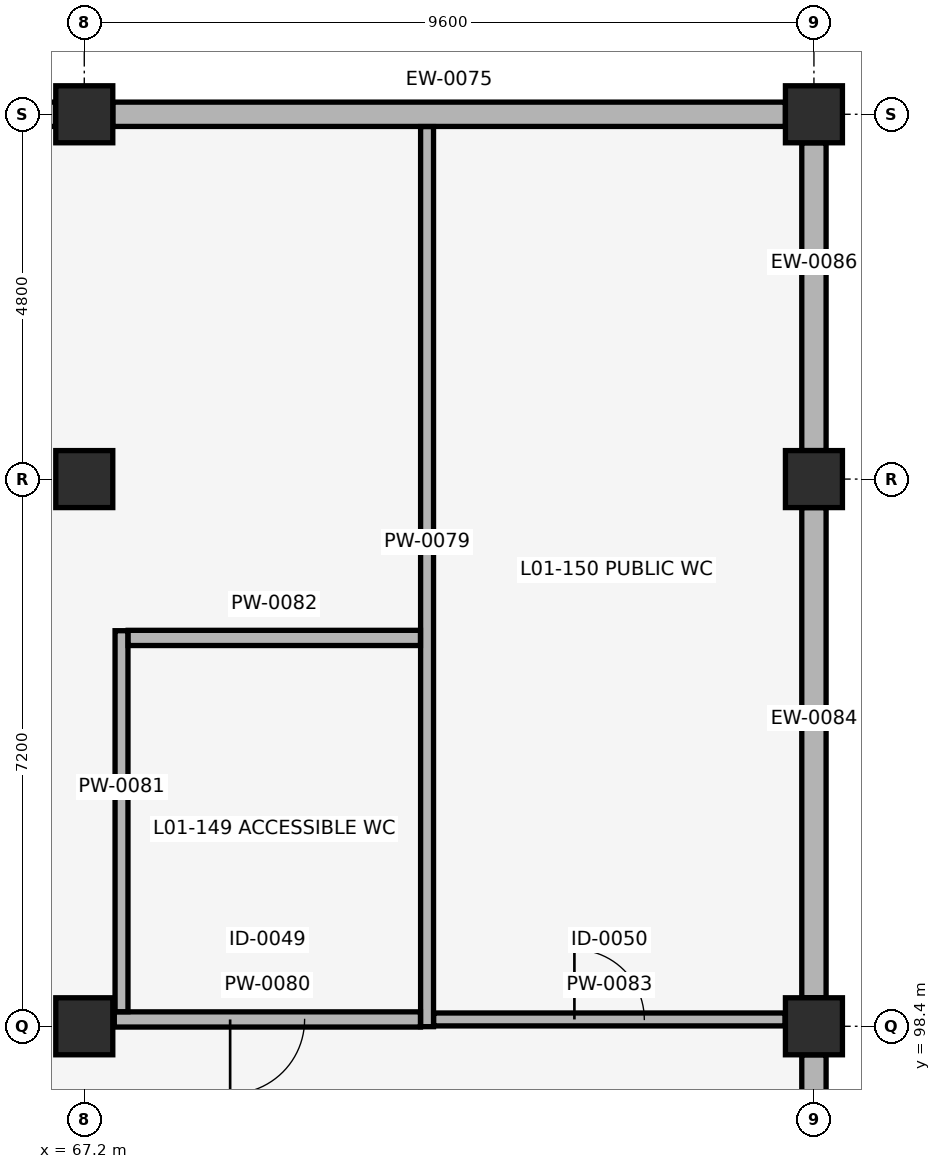
"""IFC4 building model, lengths in metres.
Left out: names, types, materials, properties, quantities, classifications, styles, units other than length and angle.
Written with IfcOpenShell. Run it as: python <this file> out.ifc"""

import sys

from ifc_helpers import new_model, si_unit, direction, frame, frame_2d, origin, origin_2d, place, context, subcontext, project, spatial, rectangle, extrude, element, fill, save


model = new_model("IFC4")
c1 = context("Model", 3, precision=1e-05, world=origin(), true_north=direction((0.0, 1.0)))
c2 = subcontext(c1, "Body", "Model", "MODEL_VIEW")
j1 = project(units=[si_unit("LENGTHUNIT", "METRE"), si_unit("PLANEANGLEUNIT", "RADIAN")], contexts=[c1])
p1 = place(None, origin())
s1 = spatial("IfcSite", under=j1, at=p1, CompositionType="ELEMENT")
p2 = place(p1, origin())
s2 = spatial("IfcBuilding", under=s1, at=p2, CompositionType="ELEMENT")
p3 = place(p2, frame((0.0, 0.0, 4.42)))
s3 = spatial("IfcBuildingStorey", under=s2, at=p3, CompositionType="ELEMENT", Elevation=4.42)
for number, where, z_axis, x_axis in (
    (1, (67.2, 98.4, 0.0), (0.0, 0.0, 1.0), (1.0, 0.0, 0.0)),
    (2, (67.2, 105.6, 0.0), (0.0, 0.0, 1.0), (1.0, 0.0, 0.0)),
    (3, (67.2, 110.4, 0.0), (0.0, 0.0, 1.0), (1.0, 0.0, 0.0)),
    (4, (76.8, 98.4, 0.0), (0.0, 0.0, 1.0), (1.0, 0.0, 0.0)),
    (5, (76.8, 105.6, 0.0), (0.0, 0.0, 1.0), (1.0, 0.0, 0.0)),
    (6, (76.8, 110.4, 0.0), (0.0, 0.0, 1.0), (1.0, 0.0, 0.0)),
):
    element("IfcColumn", number, at=place(p3, frame(where, z_axis=z_axis, x_axis=x_axis)), inside=s3, PredefinedType="COLUMN", context=c2, shape_type="SweptSolid", body=[
        extrude(rectangle(XDim=0.75, YDim=0.75, at=origin_2d()), origin(), (0.0, 0.0, 1.0), 4.08),
    ])
p4 = place(p3, frame((66.825, 110.4, 0.0), z_axis=(0.0, 0.0, 1.0), x_axis=(-1.0, 0.0, 0.0)))
e7 = element("IfcWall", 7, at=p4, inside=s3, PredefinedType="SOLIDWALL", context=c2, shape_type="SweptSolid", body=[
    extrude(rectangle(XDim=8.85, YDim=0.32, at=frame_2d((4.425, 0.0))), origin(), (0.0, 0.0, 1.0), 3.05),
])
p5 = place(p3, frame((76.425, 110.4, 0.0), z_axis=(0.0, 0.0, 1.0), x_axis=(-1.0, 0.0, 0.0)))
e8 = element("IfcWall", 8, at=p5, inside=s3, PredefinedType="SOLIDWALL", context=c2, shape_type="SweptSolid", body=[
    extrude(rectangle(XDim=8.85, YDim=0.32, at=frame_2d((4.425, 0.0))), origin(), (0.0, 0.0, 1.0), 3.05),
])
p6 = place(p3, frame((76.8, 91.575, 0.0), z_axis=(0.0, 0.0, 1.0), x_axis=(0.0, 1.0, 0.0)))
e9 = element("IfcWall", 9, at=p6, inside=s3, PredefinedType="SOLIDWALL", context=c2, shape_type="SweptSolid", body=[
    extrude(rectangle(XDim=6.45, YDim=0.32, at=frame_2d((3.225, 0.0))), origin(), (0.0, 0.0, 1.0), 3.05),
])
p7 = place(p3, frame((76.8, 98.775, 0.0), z_axis=(0.0, 0.0, 1.0), x_axis=(0.0, 1.0, 0.0)))
e10 = element("IfcWall", 10, at=p7, inside=s3, PredefinedType="SOLIDWALL", context=c2, shape_type="SweptSolid", body=[
    extrude(rectangle(XDim=6.45, YDim=0.32, at=frame_2d((3.225, 0.0))), origin(), (0.0, 0.0, 1.0), 3.05),
])
p8 = place(p3, frame((76.8, 105.975, 0.0), z_axis=(0.0, 0.0, 1.0), x_axis=(0.0, 1.0, 0.0)))
e11 = element("IfcWall", 11, at=p8, inside=s3, PredefinedType="SOLIDWALL", context=c2, shape_type="SweptSolid", body=[
    extrude(rectangle(XDim=4.05, YDim=0.32, at=frame_2d((2.025, 0.0))), origin(), (0.0, 0.0, 1.0), 3.05),
])
p9 = place(p3, frame((71.71, 98.395, 0.0), z_axis=(0.0, 0.0, 1.0), x_axis=(0.0, 1.0, 0.0)))
e12 = element("IfcWall", 12, at=p9, inside=s3, PredefinedType="PLUMBINGWALL", context=c2, shape_type="SweptSolid", body=[
    extrude(rectangle(XDim=11.843, YDim=0.17, at=frame_2d((5.921, 0.0))), origin(), (0.0, 0.0, 1.0), 3.05),
])
p10 = place(p3, frame((67.595, 98.49, 0.0), z_axis=(0.0, 0.0, 1.0), x_axis=(1.0, 0.0, 0.0)))
e13 = element("IfcWall", 13, at=p10, inside=s3, PredefinedType="PLUMBINGWALL", context=c2, shape_type="SweptSolid", body=[
    extrude(rectangle(XDim=4.028, YDim=0.2, at=frame_2d((2.014, 0.0))), origin(), (0.0, 0.0, 1.0), 3.12),
])
p11 = place(p10, frame((1.524, 0.0, 0.0)))
e14 = element("IfcOpeningElement", 14, at=p11, cuts=e13, PredefinedType="OPENING", context=c2, shape_type="SweptSolid", body=[
    extrude(rectangle(XDim=0.98, YDim=2.08, at=frame_2d((0.49, 1.04))), frame((0.0, 0.11, 0.0), z_axis=(0.0, -1.0, 0.0), x_axis=(1.0, 0.0, 0.0)), (0.0, 0.0, 1.0), 0.22),
])
p12 = place(p3, frame((67.69, 98.592, 0.0), z_axis=(0.0, 0.0, 1.0), x_axis=(0.0, 1.0, 0.0)))
e15 = element("IfcWall", 15, at=p12, inside=s3, PredefinedType="PLUMBINGWALL", context=c2, shape_type="SweptSolid", body=[
    extrude(rectangle(XDim=5.013, YDim=0.17, at=frame_2d((2.506, 0.0))), origin(), (0.0, 0.0, 1.0), 3.12),
])
p13 = place(p3, frame((67.777, 103.51, 0.0), z_axis=(0.0, 0.0, 1.0), x_axis=(1.0, 0.0, 0.0)))
e16 = element("IfcWall", 16, at=p13, inside=s3, PredefinedType="PLUMBINGWALL", context=c2, shape_type="SweptSolid", body=[
    extrude(rectangle(XDim=3.846, YDim=0.2, at=frame_2d((1.923, 0.0))), origin(), (0.0, 0.0, 1.0), 3.12),
])
p14 = place(p3, frame((71.797, 98.49, 0.0), z_axis=(0.0, 0.0, 1.0), x_axis=(1.0, 0.0, 0.0)))
e17 = element("IfcWall", 17, at=p14, inside=s3, PredefinedType="PLUMBINGWALL", context=c2, shape_type="SweptSolid", body=[
    extrude(rectangle(XDim=4.623, YDim=0.17, at=frame_2d((2.312, 0.0))), origin(), (0.0, 0.0, 1.0), 3.12),
])
p15 = place(p14, frame((1.852, 0.0, 0.0)))
e18 = element("IfcOpeningElement", 18, at=p15, cuts=e17, PredefinedType="OPENING", context=c2, shape_type="SweptSolid", body=[
    extrude(rectangle(XDim=0.92, YDim=2.08, at=frame_2d((0.46, 1.04))), frame((0.0, 0.095, 0.0), z_axis=(0.0, -1.0, 0.0), x_axis=(1.0, 0.0, 0.0)), (0.0, 0.0, 1.0), 0.19),
])
p16 = place(p11, origin())
e19 = element("IfcDoor", 19, at=p16, inside=s3, OperationType="SINGLE_SWING_RIGHT", PredefinedType="DOOR", context=c2, shape_type="SweptSolid", body=[
    extrude(rectangle(XDim=0.98, YDim=2.08, at=frame_2d((0.49, 1.04))), frame((0.0, 0.025, 0.0), z_axis=(0.0, -1.0, 0.0), x_axis=(1.0, 0.0, 0.0)), (0.0, 0.0, 1.0), 0.05),
])
fill(e14, e19)
p17 = place(p15, origin())
e20 = element("IfcDoor", 20, at=p17, inside=s3, OperationType="SINGLE_SWING_LEFT", PredefinedType="DOOR", context=c2, shape_type="SweptSolid", body=[
    extrude(rectangle(XDim=0.92, YDim=2.08, at=frame_2d((0.46, 1.04))), frame((0.0, 0.025, 0.0), z_axis=(0.0, -1.0, 0.0), x_axis=(1.0, 0.0, 0.0)), (0.0, 0.0, 1.0), 0.05),
])
fill(e18, e20)
save(model, sys.argv[1])
